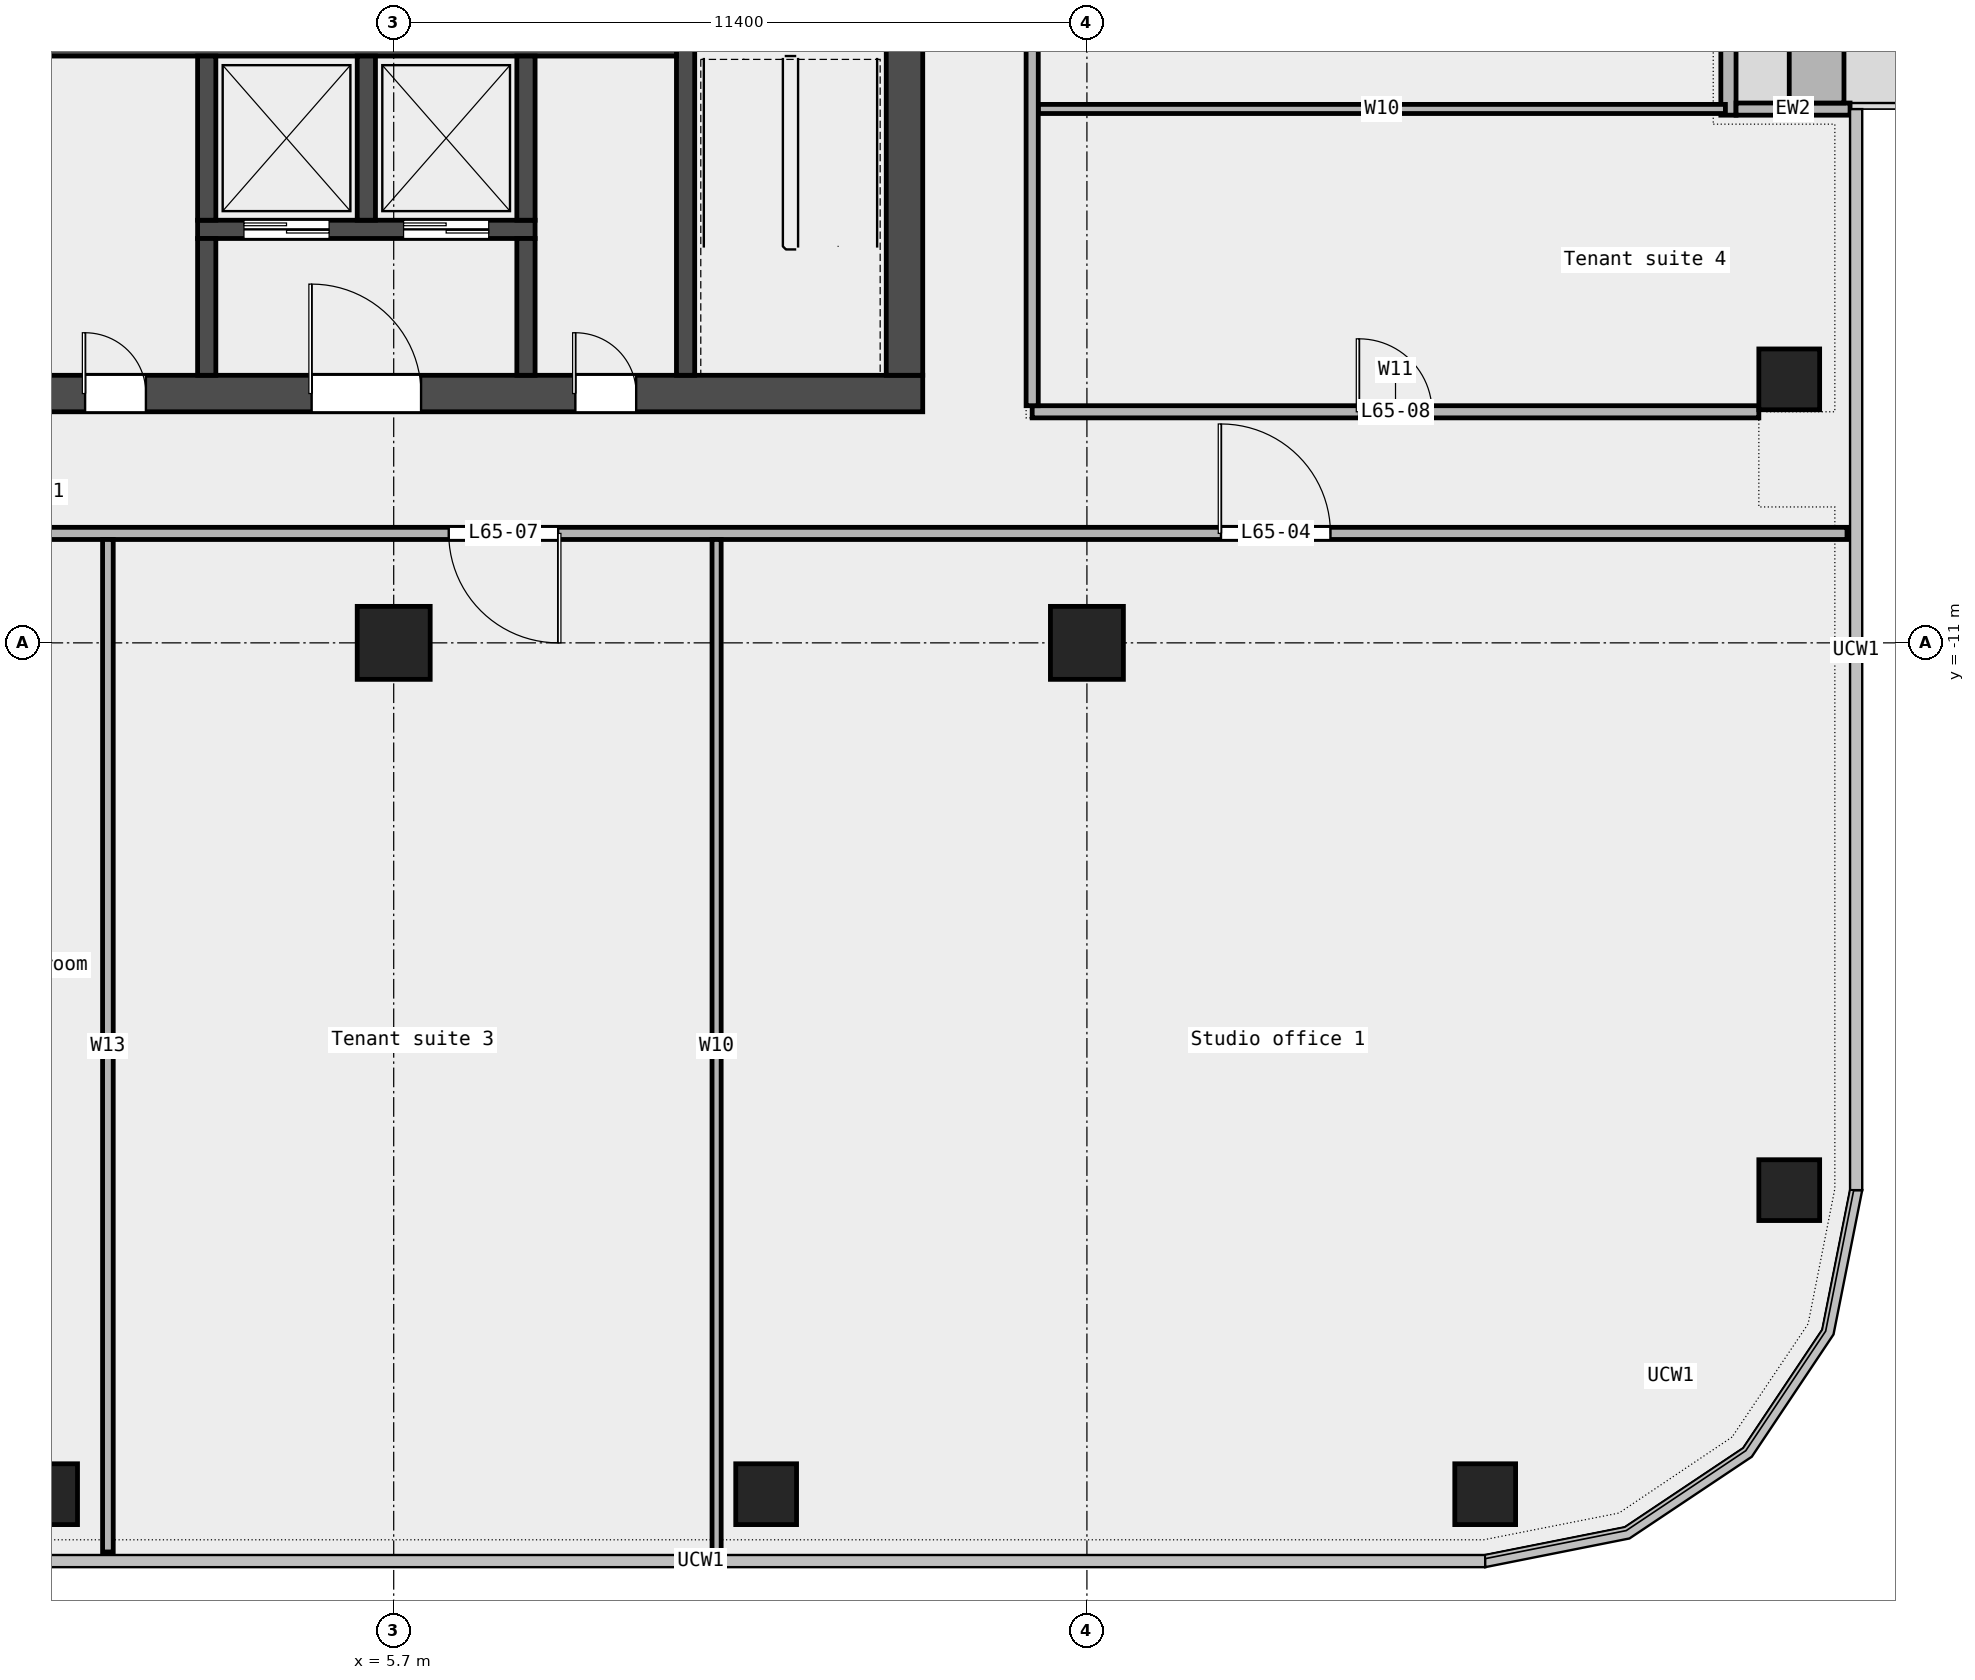
"""IFC4 building model, lengths in metres.
Left out: names, types, materials, properties, quantities, classifications, styles, units other than length and angle.
Written with IfcOpenShell. Run it as: python <this file> out.ifc"""

import sys

from ifc_helpers import new_model, si_unit, direction, frame, frame_2d, origin, origin_2d, place, context, subcontext, project, spatial, rectangle, extrude, element, fill, save


model = new_model("IFC4")
c1 = context("Model", 3, precision=1e-05, world=origin(), true_north=direction((0.0, 1.0)))
c2 = subcontext(c1, "Body", "Model", "MODEL_VIEW")
j1 = project(units=[si_unit("LENGTHUNIT", "METRE"), si_unit("PLANEANGLEUNIT", "RADIAN")], contexts=[c1])
p1 = place(None, origin())
s1 = spatial("IfcSite", under=j1, at=p1, CompositionType="ELEMENT")
p2 = place(p1, origin())
s2 = spatial("IfcBuilding", under=s1, at=p2, CompositionType="ELEMENT")
p3 = place(p2, frame((0.0, 0.0, 299.4)))
s3 = spatial("IfcBuildingStorey", under=s2, at=p3, CompositionType="ELEMENT", Elevation=299.4)
for number, where, z_axis, x_axis in (
    (1, (0.0, -25.0, 0.0), (0.0, 0.0, 1.0), (1.0, 0.0, 0.0)),
    (2, (11.825, -25.0, 0.0), (0.0, 0.0, 1.0), (1.0, 0.0, 0.0)),
    (3, (23.65, -25.0, 0.0), (0.0, 0.0, 1.0), (1.0, 0.0, 0.0)),
    (4, (28.65, -20.0, 0.0), (0.0, 0.0, 1.0), (1.0, 0.0, 0.0)),
    (5, (28.65, -6.667, 0.0), (0.0, 0.0, 1.0), (1.0, 0.0, 0.0)),
):
    element("IfcColumn", number, at=place(p3, frame(where, z_axis=z_axis, x_axis=x_axis)), inside=s3, PredefinedType="COLUMN", context=c2, shape_type="SweptSolid", body=[
        extrude(rectangle(XDim=1.0, YDim=1.0, at=origin_2d()), origin(), (0.0, 0.0, 1.0), 3.6),
    ])
for number, where, z_axis, x_axis in (
    (6, (5.7, -11.0, 0.0), (0.0, 0.0, 1.0), (1.0, 0.0, 0.0)),
    (7, (17.1, -11.0, 0.0), (0.0, 0.0, 1.0), (1.0, 0.0, 0.0)),
):
    element("IfcColumn", number, at=place(p3, frame(where, z_axis=z_axis, x_axis=x_axis)), inside=s3, PredefinedType="COLUMN", context=c2, shape_type="SweptSolid", body=[
        extrude(rectangle(XDim=1.2, YDim=1.2, at=origin_2d()), origin(), (0.0, 0.0, 1.0), 3.6),
    ])
p4 = place(p3, frame((27.65, -2.322, 0.0), z_axis=(0.0, 0.0, 1.0), x_axis=(0.0, 1.0, 0.0)))
e8 = element("IfcWall", 8, at=p4, inside=s3, PredefinedType="STANDARD", context=c2, shape_type="SweptSolid", body=[
    extrude(rectangle(XDim=13.533, YDim=0.25, at=frame_2d((6.767, 0.0))), origin(), (0.0, 0.0, 1.0), 3.6),
])
p5 = place(p4, frame((1.5, 0.0, 0.45)))
e9 = element("IfcOpeningElement", 9, at=p5, cuts=e8, PredefinedType="OPENING", context=c2, shape_type="SweptSolid", body=[
    extrude(rectangle(XDim=1.5, YDim=2.4, at=frame_2d((0.75, 1.2))), frame((0.0, 0.137, 0.0), z_axis=(0.0, -1.0, 0.0), x_axis=(1.0, 0.0, 0.0)), (0.0, 0.0, 1.0), 0.274),
])
p6 = place(p4, frame((5.75, 0.0, 0.0)))
e10 = element("IfcOpeningElement", 10, at=p6, cuts=e8, PredefinedType="OPENING", context=c2, shape_type="SweptSolid", body=[
    extrude(rectangle(XDim=1.8, YDim=2.4, at=frame_2d((0.9, 1.2))), frame((0.0, 0.137, 0.0), z_axis=(0.0, -1.0, 0.0), x_axis=(1.0, 0.0, 0.0)), (0.0, 0.0, 1.0), 0.274),
])
p7 = place(p4, frame((10.5, 0.0, 0.45)))
e11 = element("IfcOpeningElement", 11, at=p7, cuts=e8, PredefinedType="OPENING", context=c2, shape_type="SweptSolid", body=[
    extrude(rectangle(XDim=1.5, YDim=2.4, at=frame_2d((0.75, 1.2))), frame((0.0, 0.137, 0.0), z_axis=(0.0, -1.0, 0.0), x_axis=(1.0, 0.0, 0.0)), (0.0, 0.0, 1.0), 0.274),
])
p8 = place(p3, frame((29.65, -2.222, 0.0), z_axis=(0.0, 0.0, 1.0), x_axis=(-1.0, 0.0, 0.0)))
e12 = element("IfcWall", 12, at=p8, inside=s3, PredefinedType="STANDARD", context=c2, shape_type="SweptSolid", body=[
    extrude(rectangle(XDim=1.875, YDim=0.2, at=frame_2d((0.938, 0.0))), origin(), (0.0, 0.0, 1.0), 3.6),
])
p9 = place(p3, frame((29.1, -2.122, 0.0), z_axis=(0.0, 0.0, 1.0), x_axis=(0.0, 1.0, 0.0)))
e13 = element("IfcWall", 13, at=p9, inside=s3, PredefinedType="STANDARD", context=c2, shape_type="SweptSolid", body=[
    extrude(rectangle(XDim=3.6, YDim=0.9, at=frame_2d((1.8, 0.0))), origin(), (0.0, 0.0, 1.0), 0.7),
])
p10 = place(p3, frame((-29.6, -9.2, 0.0), z_axis=(0.0, 0.0, 1.0), x_axis=(1.0, 0.0, 0.0)))
e14 = element("IfcWall", 14, at=p10, inside=s3, PredefinedType="PARTITIONING", context=c2, shape_type="SweptSolid", body=[
    extrude(rectangle(XDim=59.2, YDim=0.2, at=frame_2d((29.6, 0.0))), origin(), (0.0, 0.0, 1.0), 3.6),
])
p11 = place(p10, frame((48.905, 0.0, 0.0)))
e15 = element("IfcOpeningElement", 15, at=p11, cuts=e14, PredefinedType="OPENING", context=c2, shape_type="SweptSolid", body=[
    extrude(rectangle(XDim=1.8, YDim=2.1, at=frame_2d((0.9, 1.05))), frame((0.0, 0.112, 0.0), z_axis=(0.0, -1.0, 0.0), x_axis=(1.0, 0.0, 0.0)), (0.0, 0.0, 1.0), 0.224),
])
p12 = place(p10, frame((36.205, 0.0, 0.0)))
e16 = element("IfcOpeningElement", 16, at=p12, cuts=e14, PredefinedType="OPENING", context=c2, shape_type="SweptSolid", body=[
    extrude(rectangle(XDim=1.8, YDim=2.1, at=frame_2d((0.9, 1.05))), frame((0.0, 0.112, 0.0), z_axis=(0.0, -1.0, 0.0), x_axis=(1.0, 0.0, 0.0)), (0.0, 0.0, 1.0), 0.224),
])
p13 = place(p10, frame((20.1, 0.0, 0.0)))
e17 = element("IfcOpeningElement", 17, at=p13, cuts=e14, PredefinedType="OPENING", context=c2, shape_type="SweptSolid", body=[
    extrude(rectangle(XDim=1.8, YDim=2.1, at=frame_2d((0.9, 1.05))), frame((0.0, 0.112, 0.0), z_axis=(0.0, -1.0, 0.0), x_axis=(1.0, 0.0, 0.0)), (0.0, 0.0, 1.0), 0.224),
])
p14 = place(p10, frame((6.475, 0.0, 0.0)))
e18 = element("IfcOpeningElement", 18, at=p14, cuts=e14, PredefinedType="OPENING", context=c2, shape_type="SweptSolid", body=[
    extrude(rectangle(XDim=1.8, YDim=2.1, at=frame_2d((0.9, 1.05))), frame((0.0, 0.112, 0.0), z_axis=(0.0, -1.0, 0.0), x_axis=(1.0, 0.0, 0.0)), (0.0, 0.0, 1.0), 0.224),
])
p15 = place(p10, frame((28.425, 0.0, 0.0)))
e19 = element("IfcOpeningElement", 19, at=p15, cuts=e14, PredefinedType="OPENING", context=c2, shape_type="SweptSolid", body=[
    extrude(rectangle(XDim=1.2, YDim=2.1, at=frame_2d((0.6, 1.05))), frame((0.0, 0.112, 0.0), z_axis=(0.0, -1.0, 0.0), x_axis=(1.0, 0.0, 0.0)), (0.0, 0.0, 1.0), 0.224),
])
p16 = place(p3, frame((16.2, -7.2, 0.0), z_axis=(0.0, 0.0, 1.0), x_axis=(1.0, 0.0, 0.0)))
e20 = element("IfcWall", 20, at=p16, inside=s3, PredefinedType="PARTITIONING", context=c2, shape_type="SweptSolid", body=[
    extrude(rectangle(XDim=11.95, YDim=0.2, at=frame_2d((5.975, 0.0))), origin(), (0.0, 0.0, 1.0), 3.6),
])
p17 = place(p16, frame((5.375, 0.0, 0.0)))
e21 = element("IfcOpeningElement", 21, at=p17, cuts=e20, PredefinedType="OPENING", context=c2, shape_type="SweptSolid", body=[
    extrude(rectangle(XDim=1.2, YDim=2.1, at=frame_2d((0.6, 1.05))), frame((0.0, 0.112, 0.0), z_axis=(0.0, -1.0, 0.0), x_axis=(1.0, 0.0, 0.0)), (0.0, 0.0, 1.0), 0.224),
])
p18 = place(p3, frame((16.3, -2.22, 0.0), z_axis=(0.0, 0.0, 1.0), x_axis=(1.0, 0.0, 0.0)))
e22 = element("IfcWall", 22, at=p18, inside=s3, PredefinedType="PARTITIONING", context=c2, shape_type="SweptSolid", body=[
    extrude(rectangle(XDim=11.3, YDim=0.15, at=frame_2d((5.65, 0.0))), origin(), (0.0, 0.0, 1.0), 3.6),
])
p19 = place(p3, frame((1.0, -25.95, 0.0), z_axis=(0.0, 0.0, 1.0), x_axis=(0.0, 1.0, 0.0)))
e23 = element("IfcWall", 23, at=p19, inside=s3, PredefinedType="PARTITIONING", context=c2, shape_type="SweptSolid", body=[
    extrude(rectangle(XDim=16.65, YDim=0.175, at=frame_2d((8.325, 0.0))), origin(), (0.0, 0.0, 1.0), 3.6),
])
p20 = place(p3, frame((11.01, -25.95, 0.0), z_axis=(0.0, 0.0, 1.0), x_axis=(0.0, 1.0, 0.0)))
e24 = element("IfcWall", 24, at=p20, inside=s3, PredefinedType="PARTITIONING", context=c2, shape_type="SweptSolid", body=[
    extrude(rectangle(XDim=16.65, YDim=0.15, at=frame_2d((8.325, 0.0))), origin(), (0.0, 0.0, 1.0), 3.6),
])
p21 = place(p3, frame((16.2, -7.1, 0.0), z_axis=(0.0, 0.0, 1.0), x_axis=(0.0, 1.0, 0.0)))
e25 = element("IfcWall", 25, at=p21, inside=s3, PredefinedType="PARTITIONING", context=c2, shape_type="SweptSolid", body=[
    extrude(rectangle(XDim=20.5, YDim=0.2, at=frame_2d((10.25, 0.0))), origin(), (0.0, 0.0, 1.0), 3.6),
])
p22 = place(p21, frame((10.795, 0.0, 0.0)))
e26 = element("IfcOpeningElement", 26, at=p22, cuts=e25, PredefinedType="OPENING", context=c2, shape_type="SweptSolid", body=[
    extrude(rectangle(XDim=1.5, YDim=2.1, at=frame_2d((0.75, 1.05))), frame((0.0, 0.112, 0.0), z_axis=(0.0, -1.0, 0.0), x_axis=(1.0, 0.0, 0.0)), (0.0, 0.0, 1.0), 0.224),
])
p23 = place(p3, frame((-14.4, -6.9, 0.0), z_axis=(0.0, 0.0, 1.0), x_axis=(1.0, 0.0, 0.0)))
e27 = element("IfcWall", 27, at=p23, inside=s3, PredefinedType="SHEAR", context=c2, shape_type="SweptSolid", body=[
    extrude(rectangle(XDim=28.8, YDim=0.6, at=frame_2d((14.4, 0.0))), origin(), (0.0, 0.0, 1.0), 3.7),
])
p24 = place(p23, frame((4.712, 0.0, 0.0)))
e28 = element("IfcOpeningElement", 28, at=p24, cuts=e27, PredefinedType="OPENING", context=c2, shape_type="SweptSolid", body=[
    extrude(rectangle(XDim=1.0, YDim=2.1, at=frame_2d((0.5, 1.05))), frame((0.0, 0.312, 0.0), z_axis=(0.0, -1.0, 0.0), x_axis=(1.0, 0.0, 0.0)), (0.0, 0.0, 1.0), 0.624),
])
p25 = place(p23, frame((9.675, 0.0, 0.0)))
e29 = element("IfcOpeningElement", 29, at=p25, cuts=e27, PredefinedType="OPENING", context=c2, shape_type="SweptSolid", body=[
    extrude(rectangle(XDim=1.2, YDim=2.1, at=frame_2d((0.6, 1.05))), frame((0.0, 0.312, 0.0), z_axis=(0.0, -1.0, 0.0), x_axis=(1.0, 0.0, 0.0)), (0.0, 0.0, 1.0), 0.624),
])
p26 = place(p23, frame((15.025, 0.0, 0.0)))
e30 = element("IfcOpeningElement", 30, at=p26, cuts=e27, PredefinedType="OPENING", context=c2, shape_type="SweptSolid", body=[
    extrude(rectangle(XDim=1.0, YDim=2.1, at=frame_2d((0.5, 1.05))), frame((0.0, 0.312, 0.0), z_axis=(0.0, -1.0, 0.0), x_axis=(1.0, 0.0, 0.0)), (0.0, 0.0, 1.0), 0.624),
])
p27 = place(p23, frame((18.75, 0.0, 0.0)))
e31 = element("IfcOpeningElement", 31, at=p27, cuts=e27, PredefinedType="OPENING", context=c2, shape_type="SweptSolid", body=[
    extrude(rectangle(XDim=1.8, YDim=2.1, at=frame_2d((0.9, 1.05))), frame((0.0, 0.312, 0.0), z_axis=(0.0, -1.0, 0.0), x_axis=(1.0, 0.0, 0.0)), (0.0, 0.0, 1.0), 0.624),
])
p28 = place(p23, frame((23.087, 0.0, 0.0)))
e32 = element("IfcOpeningElement", 32, at=p28, cuts=e27, PredefinedType="OPENING", context=c2, shape_type="SweptSolid", body=[
    extrude(rectangle(XDim=1.0, YDim=2.1, at=frame_2d((0.5, 1.05))), frame((0.0, 0.312, 0.0), z_axis=(0.0, -1.0, 0.0), x_axis=(1.0, 0.0, 0.0)), (0.0, 0.0, 1.0), 0.624),
])
p29 = place(p3, frame((14.1, -6.6, 0.0), z_axis=(0.0, 0.0, 1.0), x_axis=(0.0, 1.0, 0.0)))
e33 = element("IfcWall", 33, at=p29, inside=s3, PredefinedType="SHEAR", context=c2, shape_type="SweptSolid", body=[
    extrude(rectangle(XDim=19.5, YDim=0.6, at=frame_2d((9.75, 0.0))), origin(), (0.0, 0.0, 1.0), 3.7),
])
p30 = place(p29, frame((9.3, 0.0, 0.0)))
e34 = element("IfcOpeningElement", 34, at=p30, cuts=e33, PredefinedType="OPENING", context=c2, shape_type="SweptSolid", body=[
    extrude(rectangle(XDim=1.8, YDim=2.1, at=frame_2d((0.9, 1.05))), frame((0.0, 0.312, 0.0), z_axis=(0.0, -1.0, 0.0), x_axis=(1.0, 0.0, 0.0)), (0.0, 0.0, 1.0), 0.624),
])
p31 = place(p3, frame((10.5, -6.6, 0.0), z_axis=(0.0, 0.0, 1.0), x_axis=(0.0, 1.0, 0.0)))
e35 = element("IfcWall", 35, at=p31, inside=s3, PredefinedType="SHEAR", context=c2, shape_type="SweptSolid", body=[
    extrude(rectangle(XDim=8.55, YDim=0.3, at=frame_2d((4.275, 0.0))), origin(), (0.0, 0.0, 1.0), 3.7),
])
p32 = place(p3, frame((-10.35, -1.2, 0.0), z_axis=(0.0, 0.0, 1.0), x_axis=(1.0, 0.0, 0.0)))
e36 = element("IfcWall", 36, at=p32, inside=s3, PredefinedType="SOLIDWALL", context=c2, shape_type="SweptSolid", body=[
    extrude(rectangle(XDim=20.7, YDim=0.3, at=frame_2d((10.35, 0.0))), origin(), (0.0, 0.0, 1.0), 3.7),
])
p33 = place(p3, frame((2.475, -4.2, 0.0), z_axis=(0.0, 0.0, 1.0), x_axis=(1.0, 0.0, 0.0)))
e37 = element("IfcWall", 37, at=p33, inside=s3, PredefinedType="SOLIDWALL", context=c2, shape_type="SweptSolid", body=[
    extrude(rectangle(XDim=5.55, YDim=0.3, at=frame_2d((2.775, 0.0))), origin(), (0.0, 0.0, 1.0), 3.7),
])
p34 = place(p33, frame((0.762, 0.0, 0.0)))
e38 = element("IfcOpeningElement", 38, at=p34, cuts=e37, PredefinedType="OPENING", context=c2, shape_type="SweptSolid", body=[
    extrude(rectangle(XDim=1.4, YDim=2.1, at=frame_2d((0.7, 1.05))), frame((0.0, 0.162, 0.0), z_axis=(0.0, -1.0, 0.0), x_axis=(1.0, 0.0, 0.0)), (0.0, 0.0, 1.0), 0.324),
])
p35 = place(p33, frame((3.387, 0.0, 0.0)))
e39 = element("IfcOpeningElement", 39, at=p35, cuts=e37, PredefinedType="OPENING", context=c2, shape_type="SweptSolid", body=[
    extrude(rectangle(XDim=1.4, YDim=2.1, at=frame_2d((0.7, 1.05))), frame((0.0, 0.162, 0.0), z_axis=(0.0, -1.0, 0.0), x_axis=(1.0, 0.0, 0.0)), (0.0, 0.0, 1.0), 0.324),
])
p36 = place(p3, frame((2.625, -4.05, 0.0), z_axis=(0.0, 0.0, 1.0), x_axis=(0.0, 1.0, 0.0)))
e40 = element("IfcWall", 40, at=p36, inside=s3, PredefinedType="SOLIDWALL", context=c2, shape_type="SweptSolid", body=[
    extrude(rectangle(XDim=2.7, YDim=0.3, at=frame_2d((1.35, 0.0))), origin(), (0.0, 0.0, 1.0), 3.7),
])
p37 = place(p3, frame((2.625, -6.6, 0.0), z_axis=(0.0, 0.0, 1.0), x_axis=(0.0, 1.0, 0.0)))
e41 = element("IfcWall", 41, at=p37, inside=s3, PredefinedType="SOLIDWALL", context=c2, shape_type="SweptSolid", body=[
    extrude(rectangle(XDim=2.25, YDim=0.3, at=frame_2d((1.125, 0.0))), origin(), (0.0, 0.0, 1.0), 3.7),
])
for number, where, z_axis, x_axis in (
    (42, (5.25, -4.05, 0.0), (0.0, 0.0, 1.0), (0.0, 1.0, 0.0)),
    (43, (7.875, -4.05, 0.0), (0.0, 0.0, 1.0), (0.0, 1.0, 0.0)),
):
    element("IfcWall", number, at=place(p3, frame(where, z_axis=z_axis, x_axis=x_axis)), inside=s3, PredefinedType="SOLIDWALL", context=c2, shape_type="SweptSolid", body=[
        extrude(rectangle(XDim=2.7, YDim=0.3, at=frame_2d((1.35, 0.0))), origin(), (0.0, 0.0, 1.0), 3.7),
    ])
p38 = place(p3, frame((7.875, -6.6, 0.0), z_axis=(0.0, 0.0, 1.0), x_axis=(0.0, 1.0, 0.0)))
e44 = element("IfcWall", 44, at=p38, inside=s3, PredefinedType="SOLIDWALL", context=c2, shape_type="SweptSolid", body=[
    extrude(rectangle(XDim=2.25, YDim=0.3, at=frame_2d((1.125, 0.0))), origin(), (0.0, 0.0, 1.0), 3.7),
])
p39 = place(p11, origin())
e45 = element("IfcDoor", 45, at=p39, inside=s3, OperationType="DOUBLE_DOOR_SINGLE_SWING", PredefinedType="DOOR", context=c2, shape_type="SweptSolid", body=[
    extrude(rectangle(XDim=1.8, YDim=2.1, at=frame_2d((0.9, 1.05))), frame((0.0, 0.025, 0.0), z_axis=(0.0, -1.0, 0.0), x_axis=(1.0, 0.0, 0.0)), (0.0, 0.0, 1.0), 0.05),
])
fill(e15, e45)
p40 = place(p12, origin())
e46 = element("IfcDoor", 46, at=p40, inside=s3, OperationType="DOUBLE_DOOR_SINGLE_SWING", PredefinedType="DOOR", context=c2, shape_type="SweptSolid", body=[
    extrude(rectangle(XDim=1.8, YDim=2.1, at=frame_2d((0.9, 1.05))), frame((0.0, 0.025, 0.0), z_axis=(0.0, -1.0, 0.0), x_axis=(1.0, 0.0, 0.0)), (0.0, 0.0, 1.0), 0.05),
])
fill(e16, e46)
p41 = place(p17, origin())
e47 = element("IfcDoor", 47, at=p41, inside=s3, OperationType="SINGLE_SWING_LEFT", PredefinedType="DOOR", context=c2, shape_type="SweptSolid", body=[
    extrude(rectangle(XDim=1.2, YDim=2.1, at=frame_2d((0.6, 1.05))), frame((0.0, 0.025, 0.0), z_axis=(0.0, -1.0, 0.0), x_axis=(1.0, 0.0, 0.0)), (0.0, 0.0, 1.0), 0.05),
])
fill(e21, e47)
p42 = place(p34, origin())
e48 = element("IfcDoor", 48, at=p42, inside=s3, OperationType="DOUBLE_DOOR_SLIDING", PredefinedType="DOOR", context=c2, shape_type="SweptSolid", body=[
    extrude(rectangle(XDim=1.4, YDim=2.1, at=frame_2d((0.7, 1.05))), frame((0.0, 0.025, 0.0), z_axis=(0.0, -1.0, 0.0), x_axis=(1.0, 0.0, 0.0)), (0.0, 0.0, 1.0), 0.05),
])
fill(e38, e48)
p43 = place(p35, origin())
e49 = element("IfcDoor", 49, at=p43, inside=s3, OperationType="DOUBLE_DOOR_SLIDING", PredefinedType="DOOR", context=c2, shape_type="SweptSolid", body=[
    extrude(rectangle(XDim=1.4, YDim=2.1, at=frame_2d((0.7, 1.05))), frame((0.0, 0.025, 0.0), z_axis=(0.0, -1.0, 0.0), x_axis=(1.0, 0.0, 0.0)), (0.0, 0.0, 1.0), 0.05),
])
fill(e39, e49)
p44 = place(p26, origin())
e50 = element("IfcDoor", 50, at=p44, inside=s3, OperationType="SINGLE_SWING_LEFT", PredefinedType="DOOR", context=c2, shape_type="SweptSolid", body=[
    extrude(rectangle(XDim=1.0, YDim=2.1, at=frame_2d((0.5, 1.05))), frame((0.0, 0.025, 0.0), z_axis=(0.0, -1.0, 0.0), x_axis=(1.0, 0.0, 0.0)), (0.0, 0.0, 1.0), 0.05),
])
fill(e30, e50)
p45 = place(p27, origin())
e51 = element("IfcDoor", 51, at=p45, inside=s3, OperationType="DOUBLE_DOOR_SINGLE_SWING", PredefinedType="DOOR", context=c2, shape_type="SweptSolid", body=[
    extrude(rectangle(XDim=1.8, YDim=2.1, at=frame_2d((0.9, 1.05))), frame((0.0, 0.025, 0.0), z_axis=(0.0, -1.0, 0.0), x_axis=(1.0, 0.0, 0.0)), (0.0, 0.0, 1.0), 0.05),
])
fill(e31, e51)
p46 = place(p28, origin())
e52 = element("IfcDoor", 52, at=p46, inside=s3, OperationType="SINGLE_SWING_LEFT", PredefinedType="DOOR", context=c2, shape_type="SweptSolid", body=[
    extrude(rectangle(XDim=1.0, YDim=2.1, at=frame_2d((0.5, 1.05))), frame((0.0, 0.025, 0.0), z_axis=(0.0, -1.0, 0.0), x_axis=(1.0, 0.0, 0.0)), (0.0, 0.0, 1.0), 0.05),
])
fill(e32, e52)
save(model, sys.argv[1])
